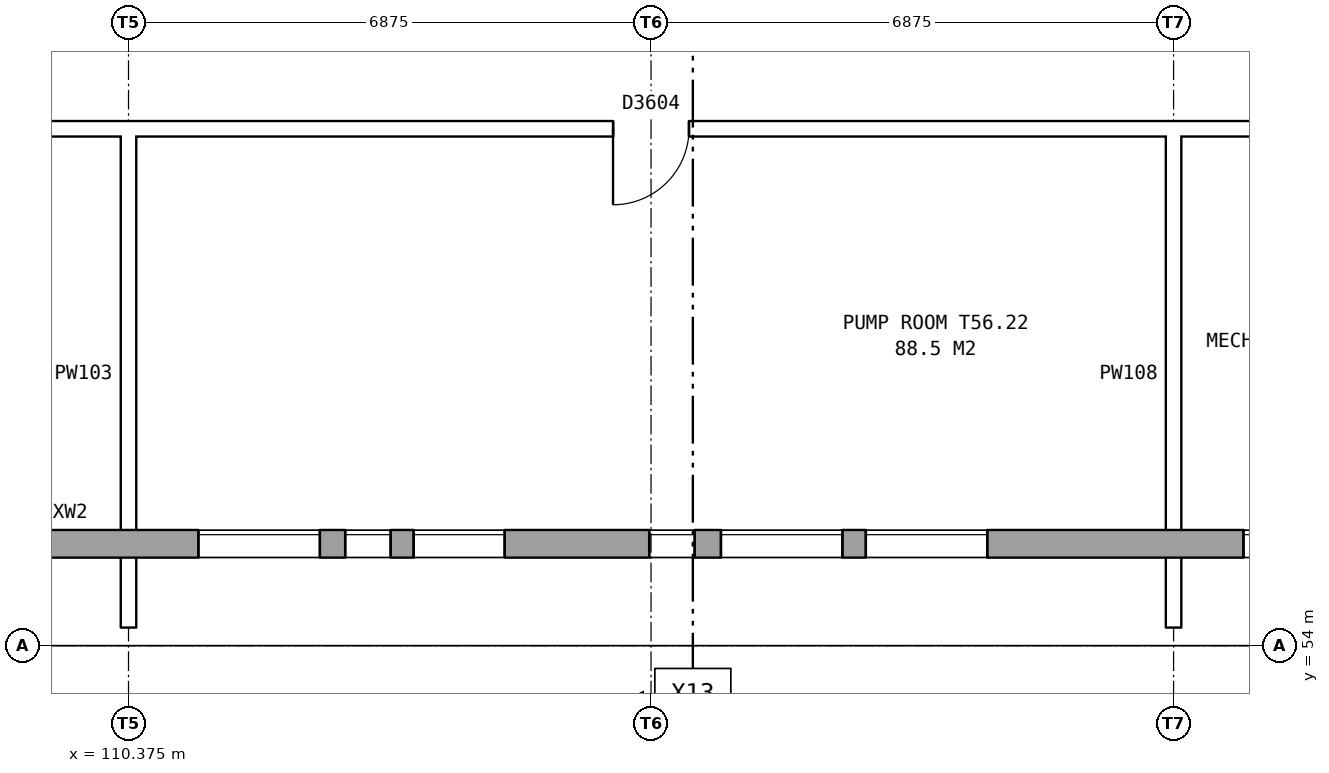
"""IFC4 building model, lengths in metres.
Left out: names, types, materials, properties, quantities, classifications, styles, units other than length and angle.
Written with IfcOpenShell. Run it as: python <this file> out.ifc"""

import sys

from ifc_helpers import new_model, si_unit, direction, frame, frame_2d, origin, place, context, subcontext, project, spatial, rectangle, extrude, element, fill, save


model = new_model("IFC4")
c1 = context("Model", 3, precision=1e-05, world=origin(), true_north=direction((0.0, 1.0)))
c2 = subcontext(c1, "Body", "Model", "MODEL_VIEW")
j1 = project(units=[si_unit("LENGTHUNIT", "METRE"), si_unit("PLANEANGLEUNIT", "RADIAN")], contexts=[c1])
p1 = place(None, origin())
s1 = spatial("IfcSite", under=j1, at=p1, CompositionType="ELEMENT")
p2 = place(p1, origin())
s2 = spatial("IfcBuilding", under=s1, at=p2, CompositionType="ELEMENT")
p3 = place(p2, frame((0.0, 0.0, 198.6)))
s3 = spatial("IfcBuildingStorey", under=s2, at=p3, CompositionType="ELEMENT", Elevation=198.6)
p4 = place(p3, frame((76.15, 55.34, 0.0), z_axis=(0.0, 0.0, 1.0), x_axis=(1.0, 0.0, 0.0)))
e1 = element("IfcWall", 1, at=p4, inside=s3, PredefinedType="STANDARD", context=c2, shape_type="SweptSolid", body=[
    extrude(rectangle(XDim=54.7, YDim=0.36, at=frame_2d((27.35, 0.0))), origin(), (0.0, 0.0, 1.0), 3.7),
])
p5 = place(p4, frame((1.75, 0.0, 1.5)))
e2 = element("IfcOpeningElement", 2, at=p5, cuts=e1, PredefinedType="OPENING", context=c2, shape_type="SweptSolid", body=[
    extrude(rectangle(XDim=0.6, YDim=1.2, at=frame_2d((0.3, 0.6))), frame((0.0, 0.19, 0.0), z_axis=(0.0, -1.0, 0.0), x_axis=(1.0, 0.0, 0.0)), (0.0, 0.0, 1.0), 0.38),
])
p6 = place(p4, frame((4.206, 0.0, 1.5)))
e3 = element("IfcOpeningElement", 3, at=p6, cuts=e1, PredefinedType="OPENING", context=c2, shape_type="SweptSolid", body=[
    extrude(rectangle(XDim=1.6, YDim=1.2, at=frame_2d((0.8, 0.6))), frame((0.0, 0.19, 0.0), z_axis=(0.0, -1.0, 0.0), x_axis=(1.0, 0.0, 0.0)), (0.0, 0.0, 1.0), 0.38),
])
p7 = place(p4, frame((8.625, 0.0, 1.5)))
e4 = element("IfcOpeningElement", 4, at=p7, cuts=e1, PredefinedType="OPENING", context=c2, shape_type="SweptSolid", body=[
    extrude(rectangle(XDim=0.6, YDim=1.2, at=frame_2d((0.3, 0.6))), frame((0.0, 0.19, 0.0), z_axis=(0.0, -1.0, 0.0), x_axis=(1.0, 0.0, 0.0)), (0.0, 0.0, 1.0), 0.38),
])
p8 = place(p4, frame((11.081, 0.0, 1.5)))
e5 = element("IfcOpeningElement", 5, at=p8, cuts=e1, PredefinedType="OPENING", context=c2, shape_type="SweptSolid", body=[
    extrude(rectangle(XDim=1.6, YDim=1.2, at=frame_2d((0.8, 0.6))), frame((0.0, 0.19, 0.0), z_axis=(0.0, -1.0, 0.0), x_axis=(1.0, 0.0, 0.0)), (0.0, 0.0, 1.0), 0.38),
])
p9 = place(p4, frame((9.525, 0.0, 1.5)))
e6 = element("IfcOpeningElement", 6, at=p9, cuts=e1, PredefinedType="OPENING", context=c2, shape_type="SweptSolid", body=[
    extrude(rectangle(XDim=1.2, YDim=1.2, at=frame_2d((0.6, 0.6))), frame((0.0, 0.19, 0.0), z_axis=(0.0, -1.0, 0.0), x_axis=(1.0, 0.0, 0.0)), (0.0, 0.0, 1.0), 0.38),
])
p10 = place(p4, frame((17.956, 0.0, 1.5)))
e7 = element("IfcOpeningElement", 7, at=p10, cuts=e1, PredefinedType="OPENING", context=c2, shape_type="SweptSolid", body=[
    extrude(rectangle(XDim=1.6, YDim=1.2, at=frame_2d((0.8, 0.6))), frame((0.0, 0.19, 0.0), z_axis=(0.0, -1.0, 0.0), x_axis=(1.0, 0.0, 0.0)), (0.0, 0.0, 1.0), 0.38),
])
p11 = place(p4, frame((22.375, 0.0, 1.5)))
e8 = element("IfcOpeningElement", 8, at=p11, cuts=e1, PredefinedType="OPENING", context=c2, shape_type="SweptSolid", body=[
    extrude(rectangle(XDim=1.6, YDim=1.2, at=frame_2d((0.8, 0.6))), frame((0.0, 0.19, 0.0), z_axis=(0.0, -1.0, 0.0), x_axis=(1.0, 0.0, 0.0)), (0.0, 0.0, 1.0), 0.38),
])
p12 = place(p4, frame((24.831, 0.0, 1.5)))
e9 = element("IfcOpeningElement", 9, at=p12, cuts=e1, PredefinedType="OPENING", context=c2, shape_type="SweptSolid", body=[
    extrude(rectangle(XDim=1.6, YDim=1.2, at=frame_2d((0.8, 0.6))), frame((0.0, 0.19, 0.0), z_axis=(0.0, -1.0, 0.0), x_axis=(1.0, 0.0, 0.0)), (0.0, 0.0, 1.0), 0.38),
])
p13 = place(p4, frame((28.269, 0.0, 1.5)))
e10 = element("IfcOpeningElement", 10, at=p13, cuts=e1, PredefinedType="OPENING", context=c2, shape_type="SweptSolid", body=[
    extrude(rectangle(XDim=1.6, YDim=1.2, at=frame_2d((0.8, 0.6))), frame((0.0, 0.19, 0.0), z_axis=(0.0, -1.0, 0.0), x_axis=(1.0, 0.0, 0.0)), (0.0, 0.0, 1.0), 0.38),
])
p14 = place(p4, frame((26.775, 0.0, 1.5)))
e11 = element("IfcOpeningElement", 11, at=p14, cuts=e1, PredefinedType="OPENING", context=c2, shape_type="SweptSolid", body=[
    extrude(rectangle(XDim=0.9, YDim=1.2, at=frame_2d((0.45, 0.6))), frame((0.0, 0.19, 0.0), z_axis=(0.0, -1.0, 0.0), x_axis=(1.0, 0.0, 0.0)), (0.0, 0.0, 1.0), 0.38),
])
p15 = place(p4, frame((35.144, 0.0, 1.5)))
e12 = element("IfcOpeningElement", 12, at=p15, cuts=e1, PredefinedType="OPENING", context=c2, shape_type="SweptSolid", body=[
    extrude(rectangle(XDim=1.6, YDim=1.2, at=frame_2d((0.8, 0.6))), frame((0.0, 0.19, 0.0), z_axis=(0.0, -1.0, 0.0), x_axis=(1.0, 0.0, 0.0)), (0.0, 0.0, 1.0), 0.38),
])
p16 = place(p4, frame((37.075, 0.0, 1.5)))
e13 = element("IfcOpeningElement", 13, at=p16, cuts=e1, PredefinedType="OPENING", context=c2, shape_type="SweptSolid", body=[
    extrude(rectangle(XDim=0.6, YDim=1.2, at=frame_2d((0.3, 0.6))), frame((0.0, 0.19, 0.0), z_axis=(0.0, -1.0, 0.0), x_axis=(1.0, 0.0, 0.0)), (0.0, 0.0, 1.0), 0.38),
])
p17 = place(p4, frame((42.019, 0.0, 1.5)))
e14 = element("IfcOpeningElement", 14, at=p17, cuts=e1, PredefinedType="OPENING", context=c2, shape_type="SweptSolid", body=[
    extrude(rectangle(XDim=1.6, YDim=1.2, at=frame_2d((0.8, 0.6))), frame((0.0, 0.19, 0.0), z_axis=(0.0, -1.0, 0.0), x_axis=(1.0, 0.0, 0.0)), (0.0, 0.0, 1.0), 0.38),
])
p18 = place(p4, frame((37.975, 0.0, 1.5)))
e15 = element("IfcOpeningElement", 15, at=p18, cuts=e1, PredefinedType="OPENING", context=c2, shape_type="SweptSolid", body=[
    extrude(rectangle(XDim=1.2, YDim=1.2, at=frame_2d((0.6, 0.6))), frame((0.0, 0.19, 0.0), z_axis=(0.0, -1.0, 0.0), x_axis=(1.0, 0.0, 0.0)), (0.0, 0.0, 1.0), 0.38),
])
p19 = place(p4, frame((48.894, 0.0, 1.5)))
e16 = element("IfcOpeningElement", 16, at=p19, cuts=e1, PredefinedType="OPENING", context=c2, shape_type="SweptSolid", body=[
    extrude(rectangle(XDim=1.6, YDim=1.2, at=frame_2d((0.8, 0.6))), frame((0.0, 0.19, 0.0), z_axis=(0.0, -1.0, 0.0), x_axis=(1.0, 0.0, 0.0)), (0.0, 0.0, 1.0), 0.38),
])
p20 = place(p4, frame((50.825, 0.0, 1.5)))
e17 = element("IfcOpeningElement", 17, at=p20, cuts=e1, PredefinedType="OPENING", context=c2, shape_type="SweptSolid", body=[
    extrude(rectangle(XDim=0.6, YDim=1.2, at=frame_2d((0.3, 0.6))), frame((0.0, 0.19, 0.0), z_axis=(0.0, -1.0, 0.0), x_axis=(1.0, 0.0, 0.0)), (0.0, 0.0, 1.0), 0.38),
])
p21 = place(p4, frame((2.65, 0.0, 1.5)))
e18 = element("IfcOpeningElement", 18, at=p21, cuts=e1, PredefinedType="OPENING", context=c2, shape_type="SweptSolid", body=[
    extrude(rectangle(XDim=1.2, YDim=1.2, at=frame_2d((0.6, 0.6))), frame((0.0, 0.19, 0.0), z_axis=(0.0, -1.0, 0.0), x_axis=(1.0, 0.0, 0.0)), (0.0, 0.0, 1.0), 0.38),
])
p22 = place(p4, frame((13.025, 0.0, 1.5)))
e19 = element("IfcOpeningElement", 19, at=p22, cuts=e1, PredefinedType="OPENING", context=c2, shape_type="SweptSolid", body=[
    extrude(rectangle(XDim=0.6, YDim=1.2, at=frame_2d((0.3, 0.6))), frame((0.0, 0.19, 0.0), z_axis=(0.0, -1.0, 0.0), x_axis=(1.0, 0.0, 0.0)), (0.0, 0.0, 1.0), 0.38),
])
p23 = place(p4, frame((15.475, 0.0, 1.5)))
e20 = element("IfcOpeningElement", 20, at=p23, cuts=e1, PredefinedType="OPENING", context=c2, shape_type="SweptSolid", body=[
    extrude(rectangle(XDim=1.6, YDim=1.2, at=frame_2d((0.8, 0.6))), frame((0.0, 0.19, 0.0), z_axis=(0.0, -1.0, 0.0), x_axis=(1.0, 0.0, 0.0)), (0.0, 0.0, 1.0), 0.38),
])
p24 = place(p4, frame((30.175, 0.0, 1.5)))
e21 = element("IfcOpeningElement", 21, at=p24, cuts=e1, PredefinedType="OPENING", context=c2, shape_type="SweptSolid", body=[
    extrude(rectangle(XDim=1.6, YDim=1.2, at=frame_2d((0.8, 0.6))), frame((0.0, 0.19, 0.0), z_axis=(0.0, -1.0, 0.0), x_axis=(1.0, 0.0, 0.0)), (0.0, 0.0, 1.0), 0.38),
])
p25 = place(p4, frame((41.075, 0.0, 1.5)))
e22 = element("IfcOpeningElement", 22, at=p25, cuts=e1, PredefinedType="OPENING", context=c2, shape_type="SweptSolid", body=[
    extrude(rectangle(XDim=0.6, YDim=1.2, at=frame_2d((0.3, 0.6))), frame((0.0, 0.19, 0.0), z_axis=(0.0, -1.0, 0.0), x_axis=(1.0, 0.0, 0.0)), (0.0, 0.0, 1.0), 0.38),
])
p26 = place(p4, frame((43.925, 0.0, 1.5)))
e23 = element("IfcOpeningElement", 23, at=p26, cuts=e1, PredefinedType="OPENING", context=c2, shape_type="SweptSolid", body=[
    extrude(rectangle(XDim=1.6, YDim=1.2, at=frame_2d((0.8, 0.6))), frame((0.0, 0.19, 0.0), z_axis=(0.0, -1.0, 0.0), x_axis=(1.0, 0.0, 0.0)), (0.0, 0.0, 1.0), 0.38),
])
p27 = place(p4, frame((51.725, 0.0, 1.5)))
e24 = element("IfcOpeningElement", 24, at=p27, cuts=e1, PredefinedType="OPENING", context=c2, shape_type="SweptSolid", body=[
    extrude(rectangle(XDim=1.2, YDim=1.2, at=frame_2d((0.6, 0.6))), frame((0.0, 0.19, 0.0), z_axis=(0.0, -1.0, 0.0), x_axis=(1.0, 0.0, 0.0)), (0.0, 0.0, 1.0), 0.38),
])
p28 = place(p3, frame((32.24, 60.8, 0.0), z_axis=(0.0, 0.0, 1.0), x_axis=(1.0, 0.0, 0.0)))
e25 = element("IfcWall", 25, at=p28, inside=s3, PredefinedType="PARTITIONING", context=c2, shape_type="SweptSolid", body=[
    extrude(rectangle(XDim=136.52, YDim=0.2, at=frame_2d((68.26, 0.0))), origin(), (0.0, 0.0, 1.0), 3.7),
])
p29 = place(p28, frame((1.94, 0.0, 0.0)))
e26 = element("IfcOpeningElement", 26, at=p29, cuts=e25, PredefinedType="OPENING", context=c2, shape_type="SweptSolid", body=[
    extrude(rectangle(XDim=1.0, YDim=2.1, at=frame_2d((0.5, 1.05))), frame((0.0, 0.11, 0.0), z_axis=(0.0, -1.0, 0.0), x_axis=(1.0, 0.0, 0.0)), (0.0, 0.0, 1.0), 0.22),
])
p30 = place(p28, frame((8.76, 0.0, 0.0)))
e27 = element("IfcOpeningElement", 27, at=p30, cuts=e25, PredefinedType="OPENING", context=c2, shape_type="SweptSolid", body=[
    extrude(rectangle(XDim=1.0, YDim=2.1, at=frame_2d((0.5, 1.05))), frame((0.0, 0.11, 0.0), z_axis=(0.0, -1.0, 0.0), x_axis=(1.0, 0.0, 0.0)), (0.0, 0.0, 1.0), 0.22),
])
p31 = place(p28, frame((20.46, 0.0, 0.0)))
e28 = element("IfcOpeningElement", 28, at=p31, cuts=e25, PredefinedType="OPENING", context=c2, shape_type="SweptSolid", body=[
    extrude(rectangle(XDim=1.0, YDim=2.1, at=frame_2d((0.5, 1.05))), frame((0.0, 0.11, 0.0), z_axis=(0.0, -1.0, 0.0), x_axis=(1.0, 0.0, 0.0)), (0.0, 0.0, 1.0), 0.22),
])
p32 = place(p28, frame((30.06, 0.0, 0.0)))
e29 = element("IfcOpeningElement", 29, at=p32, cuts=e25, PredefinedType="OPENING", context=c2, shape_type="SweptSolid", body=[
    extrude(rectangle(XDim=1.0, YDim=2.1, at=frame_2d((0.5, 1.05))), frame((0.0, 0.11, 0.0), z_axis=(0.0, -1.0, 0.0), x_axis=(1.0, 0.0, 0.0)), (0.0, 0.0, 1.0), 0.22),
])
p33 = place(p28, frame((40.08, 0.0, 0.0)))
e30 = element("IfcOpeningElement", 30, at=p33, cuts=e25, PredefinedType="OPENING", context=c2, shape_type="SweptSolid", body=[
    extrude(rectangle(XDim=1.0, YDim=2.1, at=frame_2d((0.5, 1.05))), frame((0.0, 0.11, 0.0), z_axis=(0.0, -1.0, 0.0), x_axis=(1.0, 0.0, 0.0)), (0.0, 0.0, 1.0), 0.22),
])
p34 = place(p28, frame((46.517, 0.0, 0.0)))
e31 = element("IfcOpeningElement", 31, at=p34, cuts=e25, PredefinedType="OPENING", context=c2, shape_type="SweptSolid", body=[
    extrude(rectangle(XDim=1.0, YDim=2.1, at=frame_2d((0.5, 1.05))), frame((0.0, 0.11, 0.0), z_axis=(0.0, -1.0, 0.0), x_axis=(1.0, 0.0, 0.0)), (0.0, 0.0, 1.0), 0.22),
])
p35 = place(p28, frame((57.01, 0.0, 0.0)))
e32 = element("IfcOpeningElement", 32, at=p35, cuts=e25, PredefinedType="OPENING", context=c2, shape_type="SweptSolid", body=[
    extrude(rectangle(XDim=1.0, YDim=2.1, at=frame_2d((0.5, 1.05))), frame((0.0, 0.11, 0.0), z_axis=(0.0, -1.0, 0.0), x_axis=(1.0, 0.0, 0.0)), (0.0, 0.0, 1.0), 0.22),
])
p36 = place(p28, frame((70.76, 0.0, 0.0)))
e33 = element("IfcOpeningElement", 33, at=p36, cuts=e25, PredefinedType="OPENING", context=c2, shape_type="SweptSolid", body=[
    extrude(rectangle(XDim=1.0, YDim=2.1, at=frame_2d((0.5, 1.05))), frame((0.0, 0.11, 0.0), z_axis=(0.0, -1.0, 0.0), x_axis=(1.0, 0.0, 0.0)), (0.0, 0.0, 1.0), 0.22),
])
p37 = place(p28, frame((84.51, 0.0, 0.0)))
e34 = element("IfcOpeningElement", 34, at=p37, cuts=e25, PredefinedType="OPENING", context=c2, shape_type="SweptSolid", body=[
    extrude(rectangle(XDim=1.0, YDim=2.1, at=frame_2d((0.5, 1.05))), frame((0.0, 0.11, 0.0), z_axis=(0.0, -1.0, 0.0), x_axis=(1.0, 0.0, 0.0)), (0.0, 0.0, 1.0), 0.22),
])
p38 = place(p28, frame((95.003, 0.0, 0.0)))
e35 = element("IfcOpeningElement", 35, at=p38, cuts=e25, PredefinedType="OPENING", context=c2, shape_type="SweptSolid", body=[
    extrude(rectangle(XDim=1.0, YDim=2.1, at=frame_2d((0.5, 1.05))), frame((0.0, 0.11, 0.0), z_axis=(0.0, -1.0, 0.0), x_axis=(1.0, 0.0, 0.0)), (0.0, 0.0, 1.0), 0.22),
])
p39 = place(p28, frame((101.44, 0.0, 0.0)))
e36 = element("IfcOpeningElement", 36, at=p39, cuts=e25, PredefinedType="OPENING", context=c2, shape_type="SweptSolid", body=[
    extrude(rectangle(XDim=1.0, YDim=2.1, at=frame_2d((0.5, 1.05))), frame((0.0, 0.11, 0.0), z_axis=(0.0, -1.0, 0.0), x_axis=(1.0, 0.0, 0.0)), (0.0, 0.0, 1.0), 0.22),
])
p40 = place(p28, frame((111.56, 0.0, 0.0)))
e37 = element("IfcOpeningElement", 37, at=p40, cuts=e25, PredefinedType="OPENING", context=c2, shape_type="SweptSolid", body=[
    extrude(rectangle(XDim=1.0, YDim=2.1, at=frame_2d((0.5, 1.05))), frame((0.0, 0.11, 0.0), z_axis=(0.0, -1.0, 0.0), x_axis=(1.0, 0.0, 0.0)), (0.0, 0.0, 1.0), 0.22),
])
p41 = place(p28, frame((123.56, 0.0, 0.0)))
e38 = element("IfcOpeningElement", 38, at=p41, cuts=e25, PredefinedType="OPENING", context=c2, shape_type="SweptSolid", body=[
    extrude(rectangle(XDim=1.0, YDim=2.1, at=frame_2d((0.5, 1.05))), frame((0.0, 0.11, 0.0), z_axis=(0.0, -1.0, 0.0), x_axis=(1.0, 0.0, 0.0)), (0.0, 0.0, 1.0), 0.22),
])
p42 = place(p28, frame((132.08, 0.0, 0.0)))
e39 = element("IfcOpeningElement", 39, at=p42, cuts=e25, PredefinedType="OPENING", context=c2, shape_type="SweptSolid", body=[
    extrude(rectangle(XDim=1.0, YDim=2.1, at=frame_2d((0.5, 1.05))), frame((0.0, 0.11, 0.0), z_axis=(0.0, -1.0, 0.0), x_axis=(1.0, 0.0, 0.0)), (0.0, 0.0, 1.0), 0.22),
])
for number, where, z_axis, x_axis in (
    (40, (110.375, 54.24, 0.0), (0.0, 0.0, 1.0), (0.0, 1.0, 0.0)),
    (41, (124.125, 54.24, 0.0), (0.0, 0.0, 1.0), (0.0, 1.0, 0.0)),
):
    element("IfcWall", number, at=place(p3, frame(where, z_axis=z_axis, x_axis=x_axis)), inside=s3, PredefinedType="PARTITIONING", context=c2, shape_type="SweptSolid", body=[
        extrude(rectangle(XDim=6.66, YDim=0.2, at=frame_2d((3.33, 0.0))), origin(), (0.0, 0.0, 1.0), 3.167),
    ])
p43 = place(p15, origin())
e42 = element("IfcWindow", 42, at=p43, inside=s3, PartitioningType="DOUBLE_PANEL_HORIZONTAL", PredefinedType="WINDOW", context=c2, shape_type="SweptSolid", body=[
    extrude(rectangle(XDim=1.6, YDim=1.2, at=frame_2d((0.8, 0.6))), frame((0.0, 0.15, 0.0), z_axis=(0.0, -1.0, 0.0), x_axis=(1.0, 0.0, 0.0)), (0.0, 0.0, 1.0), 0.06),
])
fill(e12, e42)
p44 = place(p16, origin())
e43 = element("IfcWindow", 43, at=p44, inside=s3, PartitioningType="DOUBLE_PANEL_HORIZONTAL", PredefinedType="WINDOW", context=c2, shape_type="SweptSolid", body=[
    extrude(rectangle(XDim=0.6, YDim=1.2, at=frame_2d((0.3, 0.6))), frame((0.0, 0.15, 0.0), z_axis=(0.0, -1.0, 0.0), x_axis=(1.0, 0.0, 0.0)), (0.0, 0.0, 1.0), 0.06),
])
fill(e13, e43)
p45 = place(p17, origin())
e44 = element("IfcWindow", 44, at=p45, inside=s3, PartitioningType="DOUBLE_PANEL_HORIZONTAL", PredefinedType="WINDOW", context=c2, shape_type="SweptSolid", body=[
    extrude(rectangle(XDim=1.6, YDim=1.2, at=frame_2d((0.8, 0.6))), frame((0.0, 0.15, 0.0), z_axis=(0.0, -1.0, 0.0), x_axis=(1.0, 0.0, 0.0)), (0.0, 0.0, 1.0), 0.06),
])
fill(e14, e44)
p46 = place(p18, origin())
e45 = element("IfcWindow", 45, at=p46, inside=s3, PartitioningType="DOUBLE_PANEL_HORIZONTAL", PredefinedType="WINDOW", context=c2, shape_type="SweptSolid", body=[
    extrude(rectangle(XDim=1.2, YDim=1.2, at=frame_2d((0.6, 0.6))), frame((0.0, 0.15, 0.0), z_axis=(0.0, -1.0, 0.0), x_axis=(1.0, 0.0, 0.0)), (0.0, 0.0, 1.0), 0.06),
])
fill(e15, e45)
p47 = place(p19, origin())
e46 = element("IfcWindow", 46, at=p47, inside=s3, PartitioningType="DOUBLE_PANEL_HORIZONTAL", PredefinedType="WINDOW", context=c2, shape_type="SweptSolid", body=[
    extrude(rectangle(XDim=1.6, YDim=1.2, at=frame_2d((0.8, 0.6))), frame((0.0, 0.15, 0.0), z_axis=(0.0, -1.0, 0.0), x_axis=(1.0, 0.0, 0.0)), (0.0, 0.0, 1.0), 0.06),
])
fill(e16, e46)
p48 = place(p37, frame((1.0, 0.0, 0.0), z_axis=(0.0, 0.0, 1.0), x_axis=(-1.0, 0.0, 0.0)))
e47 = element("IfcDoor", 47, at=p48, inside=s3, OperationType="SINGLE_SWING_RIGHT", PredefinedType="DOOR", context=c2, shape_type="SweptSolid", body=[
    extrude(rectangle(XDim=1.0, YDim=2.1, at=frame_2d((0.5, 1.05))), frame((0.0, 0.025, 0.0), z_axis=(0.0, -1.0, 0.0), x_axis=(1.0, 0.0, 0.0)), (0.0, 0.0, 1.0), 0.05),
])
fill(e34, e47)
p49 = place(p25, origin())
e48 = element("IfcWindow", 48, at=p49, inside=s3, PartitioningType="DOUBLE_PANEL_HORIZONTAL", PredefinedType="WINDOW", context=c2, shape_type="SweptSolid", body=[
    extrude(rectangle(XDim=0.6, YDim=1.2, at=frame_2d((0.3, 0.6))), frame((0.0, 0.15, 0.0), z_axis=(0.0, -1.0, 0.0), x_axis=(1.0, 0.0, 0.0)), (0.0, 0.0, 1.0), 0.06),
])
fill(e22, e48)
p50 = place(p26, origin())
e49 = element("IfcWindow", 49, at=p50, inside=s3, PartitioningType="DOUBLE_PANEL_HORIZONTAL", PredefinedType="WINDOW", context=c2, shape_type="SweptSolid", body=[
    extrude(rectangle(XDim=1.6, YDim=1.2, at=frame_2d((0.8, 0.6))), frame((0.0, 0.15, 0.0), z_axis=(0.0, -1.0, 0.0), x_axis=(1.0, 0.0, 0.0)), (0.0, 0.0, 1.0), 0.06),
])
fill(e23, e49)
save(model, sys.argv[1])
